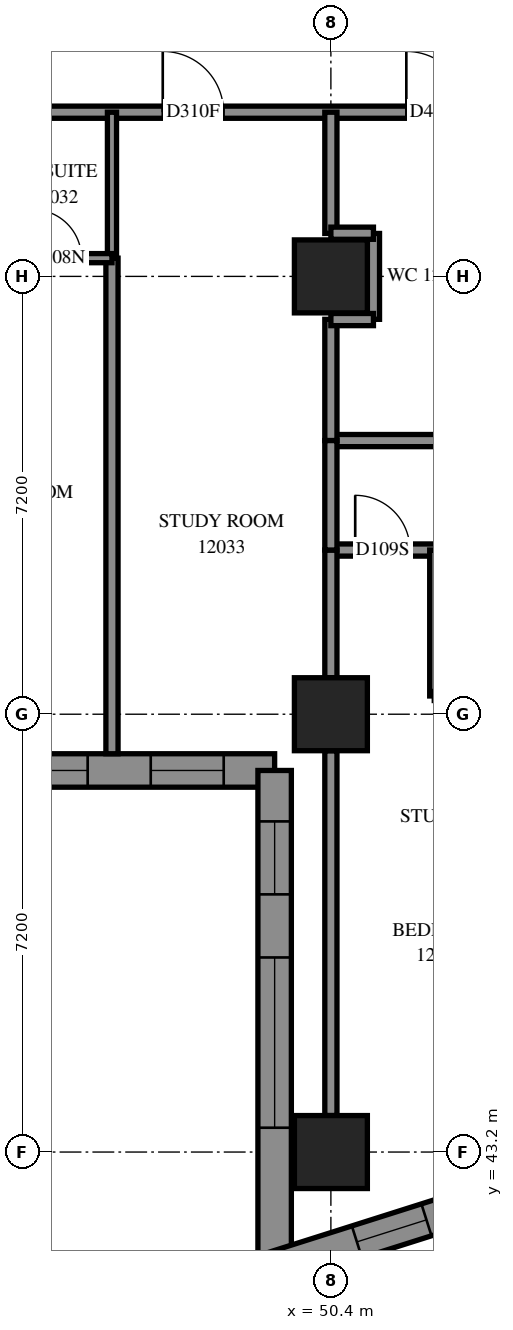
"""IFC4 building model, lengths in metres.
Left out: names, types, materials, properties, quantities, classifications, styles, units other than length and angle.
Written with IfcOpenShell. Run it as: python <this file> out.ifc"""

import sys

from ifc_helpers import new_model, si_unit, direction, frame, frame_2d, origin, origin_2d, place, context, subcontext, project, spatial, polyline, rectangle, outline, extrude, element, fill, save


model = new_model("IFC4")
c1 = context("Model", 3, precision=1e-05, world=origin(), true_north=direction((0.0, 1.0)))
c2 = subcontext(c1, "Body", "Model", "MODEL_VIEW")
j1 = project(units=[si_unit("LENGTHUNIT", "METRE"), si_unit("PLANEANGLEUNIT", "RADIAN")], contexts=[c1])
p1 = place(None, origin())
s1 = spatial("IfcSite", under=j1, at=p1, CompositionType="ELEMENT")
p2 = place(p1, origin())
s2 = spatial("IfcBuilding", under=s1, at=p2, CompositionType="ELEMENT")
p3 = place(p2, frame((0.0, 0.0, 47.4)))
s3 = spatial("IfcBuildingStorey", under=s2, at=p3, CompositionType="ELEMENT", Elevation=47.4)
for number, where, z_axis, x_axis in (
    (1, (50.4, 43.2, 0.0), (0.0, 0.0, 1.0), (1.0, 0.0, 0.0)),
    (2, (50.4, 50.4, 0.0), (0.0, 0.0, 1.0), (1.0, 0.0, 0.0)),
    (3, (50.4, 57.6, 0.0), (0.0, 0.0, 1.0), (1.0, 0.0, 0.0)),
):
    element("IfcColumn", number, at=place(p3, frame(where, z_axis=z_axis, x_axis=x_axis)), inside=s3, PredefinedType="COLUMN", context=c2, shape_type="SweptSolid", body=[
        extrude(rectangle(XDim=1.2, YDim=1.2, at=origin_2d()), origin(), (0.0, 0.0, 1.0), 3.1),
    ])
p4 = place(p3, frame((42.275, 49.475, 0.0), z_axis=(0.0, 0.0, 1.0), x_axis=(1.0, 0.0, 0.0)))
e4 = element("IfcWall", 4, at=p4, inside=s3, PredefinedType="SOLIDWALL", context=c2, shape_type="SweptSolid", body=[
    extrude(outline(polyline([(-0.275, -0.275), (6.925, -0.275), (7.475, 0.275), (0.275, 0.275), (-0.275, -0.275)])), origin(), (0.0, 0.0, 1.0), 3.1),
])
p5 = place(p4, frame((1.325, 0.0, 0.5)))
e5 = element("IfcOpeningElement", 5, at=p5, cuts=e4, PredefinedType="OPENING", context=c2, shape_type="SweptSolid", body=[
    extrude(rectangle(XDim=2.8, YDim=2.45, at=frame_2d((1.4, 1.225))), frame((0.0, 0.285, 0.0), z_axis=(0.0, -1.0, 0.0), x_axis=(1.0, 0.0, 0.0)), (0.0, 0.0, 1.0), 0.57),
])
p6 = place(p4, frame((5.162, 0.0, 0.5)))
e6 = element("IfcOpeningElement", 6, at=p6, cuts=e4, PredefinedType="OPENING", context=c2, shape_type="SweptSolid", body=[
    extrude(rectangle(XDim=1.2, YDim=2.45, at=frame_2d((0.6, 1.225))), frame((0.0, 0.285, 0.0), z_axis=(0.0, -1.0, 0.0), x_axis=(1.0, 0.0, 0.0)), (0.0, 0.0, 1.0), 0.57),
])
p7 = place(p3, frame((49.475, 49.475, 0.0), z_axis=(0.0, 0.0, 1.0), x_axis=(0.0, -1.0, 0.0)))
e7 = element("IfcWall", 7, at=p7, inside=s3, PredefinedType="SOLIDWALL", context=c2, shape_type="SweptSolid", body=[
    extrude(outline(polyline([(0.275, -0.275), (8.557, -0.275), (7.806, 0.275), (-0.275, 0.275), (0.275, -0.275)])), origin(), (0.0, 0.0, 1.0), 3.1),
])
p8 = place(p7, frame((3.075, 0.0, 0.5)))
e8 = element("IfcOpeningElement", 8, at=p8, cuts=e7, PredefinedType="OPENING", context=c2, shape_type="SweptSolid", body=[
    extrude(rectangle(XDim=2.8, YDim=2.45, at=frame_2d((1.4, 1.225))), frame((0.0, 0.285, 0.0), z_axis=(0.0, -1.0, 0.0), x_axis=(1.0, 0.0, 0.0)), (0.0, 0.0, 1.0), 0.57),
])
p9 = place(p7, frame((0.838, 0.0, 0.5)))
e9 = element("IfcOpeningElement", 9, at=p9, cuts=e7, PredefinedType="OPENING", context=c2, shape_type="SweptSolid", body=[
    extrude(rectangle(XDim=1.2, YDim=2.45, at=frame_2d((0.6, 1.225))), frame((0.0, 0.285, 0.0), z_axis=(0.0, -1.0, 0.0), x_axis=(1.0, 0.0, 0.0)), (0.0, 0.0, 1.0), 0.57),
])
p10 = place(p3, frame((49.475, 41.294, 0.0), z_axis=(0.0, 0.0, 1.0), x_axis=(0.9532643936, 0.3021373791, 0.0)))
e10 = element("IfcWall", 10, at=p10, inside=s3, PredefinedType="SOLIDWALL", context=c2, shape_type="SweptSolid", body=[
    extrude(outline(polyline([(-0.376, -0.275), (3.205, -0.275), (3.33, 0.275), (0.376, 0.275), (-0.376, -0.275)])), origin(), (0.0, 0.0, 1.0), 3.1),
])
p11 = place(p10, frame((1.419, 0.0, 0.5)))
e11 = element("IfcOpeningElement", 11, at=p11, cuts=e10, PredefinedType="OPENING", context=c2, shape_type="SweptSolid", body=[
    extrude(rectangle(XDim=1.2, YDim=2.45, at=frame_2d((0.6, 1.225))), frame((0.0, 0.285, 0.0), z_axis=(0.0, -1.0, 0.0), x_axis=(1.0, 0.0, 0.0)), (0.0, 0.0, 1.0), 0.57),
])
p12 = place(p3, frame((28.802, 60.3, 0.0), z_axis=(0.0, 0.0, 1.0), x_axis=(1.0, 0.0, 0.0)))
e12 = element("IfcWall", 12, at=p12, inside=s3, PredefinedType="PARTITIONING", context=c2, shape_type="SweptSolid", body=[
    extrude(rectangle(XDim=24.108, YDim=0.2, at=frame_2d((12.054, 0.0))), origin(), (0.0, 0.0, 1.0), 3.1),
])
p13 = place(p12, frame((11.323, 0.0, 0.0)))
e13 = element("IfcOpeningElement", 13, at=p13, cuts=e12, PredefinedType="OPENING", context=c2, shape_type="SweptSolid", body=[
    extrude(rectangle(XDim=1.0, YDim=2.1, at=frame_2d((0.5, 1.05))), frame((0.0, 0.11, 0.0), z_axis=(0.0, -1.0, 0.0), x_axis=(1.0, 0.0, 0.0)), (0.0, 0.0, 1.0), 0.22),
])
p14 = place(p12, frame((14.798, 0.0, 0.0)))
e14 = element("IfcOpeningElement", 14, at=p14, cuts=e12, PredefinedType="OPENING", context=c2, shape_type="SweptSolid", body=[
    extrude(rectangle(XDim=0.9, YDim=2.1, at=frame_2d((0.45, 1.05))), frame((0.0, 0.11, 0.0), z_axis=(0.0, -1.0, 0.0), x_axis=(1.0, 0.0, 0.0)), (0.0, 0.0, 1.0), 0.22),
])
p15 = place(p12, frame((18.833, 0.0, 0.0)))
e15 = element("IfcOpeningElement", 15, at=p15, cuts=e12, PredefinedType="OPENING", context=c2, shape_type="SweptSolid", body=[
    extrude(rectangle(XDim=1.0, YDim=2.1, at=frame_2d((0.5, 1.05))), frame((0.0, 0.11, 0.0), z_axis=(0.0, -1.0, 0.0), x_axis=(1.0, 0.0, 0.0)), (0.0, 0.0, 1.0), 0.22),
])
p16 = place(p12, frame((22.839, 0.0, 0.0)))
e16 = element("IfcOpeningElement", 16, at=p16, cuts=e12, PredefinedType="OPENING", context=c2, shape_type="SweptSolid", body=[
    extrude(rectangle(XDim=1.0, YDim=2.1, at=frame_2d((0.5, 1.05))), frame((0.0, 0.11, 0.0), z_axis=(0.0, -1.0, 0.0), x_axis=(1.0, 0.0, 0.0)), (0.0, 0.0, 1.0), 0.22),
])
p17 = place(p3, frame((46.8, 49.75, 0.0), z_axis=(0.0, 0.0, 1.0), x_axis=(0.0, 1.0, 0.0)))
e17 = element("IfcWall", 17, at=p17, inside=s3, PredefinedType="PARTITIONING", context=c2, shape_type="SweptSolid", body=[
    extrude(rectangle(XDim=8.15, YDim=0.2, at=frame_2d((4.075, 0.0))), origin(), (0.0, 0.0, 1.0), 3.1),
])
p18 = place(p3, frame((50.4, 43.8, 0.0), z_axis=(0.0, 0.0, 1.0), x_axis=(0.0, 1.0, 0.0)))
e18 = element("IfcWall", 18, at=p18, inside=s3, PredefinedType="PARTITIONING", context=c2, shape_type="SweptSolid", body=[
    extrude(rectangle(XDim=6.0, YDim=0.2, at=frame_2d((3.0, 0.0))), origin(), (0.0, 0.0, 1.0), 2.6),
])
p19 = place(p3, frame((50.4, 53.1, 0.0), z_axis=(0.0, 0.0, 1.0), x_axis=(1.0, 0.0, 0.0)))
e19 = element("IfcWall", 19, at=p19, inside=s3, PredefinedType="PARTITIONING", context=c2, shape_type="SweptSolid", body=[
    extrude(rectangle(XDim=4.1, YDim=0.2, at=frame_2d((2.05, 0.0))), origin(), (0.0, 0.0, 1.0), 3.1),
])
p20 = place(p19, frame((0.4, 0.0, 0.0)))
e20 = element("IfcOpeningElement", 20, at=p20, cuts=e19, PredefinedType="OPENING", context=c2, shape_type="SweptSolid", body=[
    extrude(rectangle(XDim=0.9, YDim=2.1, at=frame_2d((0.45, 1.05))), frame((0.0, 0.11, 0.0), z_axis=(0.0, -1.0, 0.0), x_axis=(1.0, 0.0, 0.0)), (0.0, 0.0, 1.0), 0.22),
])
p21 = place(p3, frame((50.4, 54.9, 0.0), z_axis=(0.0, 0.0, 1.0), x_axis=(1.0, 0.0, 0.0)))
e21 = element("IfcWall", 21, at=p21, inside=s3, PredefinedType="PARTITIONING", context=c2, shape_type="SweptSolid", body=[
    extrude(rectangle(XDim=2.51, YDim=0.2, at=frame_2d((1.255, 0.0))), origin(), (0.0, 0.0, 1.0), 3.1),
])
for number, where, z_axis, x_axis in (
    (22, (46.8, 57.9, 0.0), (0.0, 0.0, 1.0), (0.0, 1.0, 0.0)),
    (23, (52.1, 50.7, 0.0), (0.0, 0.0, 1.0), (0.0, 1.0, 0.0)),
):
    element("IfcWall", number, at=place(p3, frame(where, z_axis=z_axis, x_axis=x_axis)), inside=s3, PredefinedType="PARTITIONING", context=c2, shape_type="SweptSolid", body=[
        extrude(rectangle(XDim=2.4, YDim=0.15, at=frame_2d((1.2, 0.0))), origin(), (0.0, 0.0, 1.0), 3.1),
    ])
p22 = place(p3, frame((50.4, 51.0, 0.0), z_axis=(0.0, 0.0, 1.0), x_axis=(0.0, 1.0, 0.0)))
e24 = element("IfcWall", 24, at=p22, inside=s3, PredefinedType="PARTITIONING", context=c2, shape_type="SweptSolid", body=[
    extrude(rectangle(XDim=2.1, YDim=0.2, at=frame_2d((1.05, 0.0))), origin(), (0.0, 0.0, 1.0), 3.1),
])
for number, where, z_axis, x_axis in (
    (25, (50.4, 54.9, 0.0), (0.0, 0.0, 1.0), (0.0, 1.0, 0.0)),
    (26, (50.4, 58.306, 0.0), (0.0, 0.0, 1.0), (0.0, 1.0, 0.0)),
):
    element("IfcWall", number, at=place(p3, frame(where, z_axis=z_axis, x_axis=x_axis)), inside=s3, PredefinedType="PARTITIONING", context=c2, shape_type="SweptSolid", body=[
        extrude(rectangle(XDim=1.994, YDim=0.2, at=frame_2d((0.997, 0.0))), origin(), (0.0, 0.0, 1.0), 3.1),
    ])
p23 = place(p3, frame((44.9, 57.9, 0.0), z_axis=(0.0, 0.0, 1.0), x_axis=(1.0, 0.0, 0.0)))
e27 = element("IfcWall", 27, at=p23, inside=s3, PredefinedType="PARTITIONING", context=c2, shape_type="SweptSolid", body=[
    extrude(rectangle(XDim=1.9, YDim=0.15, at=frame_2d((0.95, 0.0))), origin(), (0.0, 0.0, 1.0), 3.1),
])
p24 = place(p23, frame((0.598, 0.0, 0.0)))
e28 = element("IfcOpeningElement", 28, at=p24, cuts=e27, PredefinedType="OPENING", context=c2, shape_type="SweptSolid", body=[
    extrude(rectangle(XDim=0.8, YDim=2.1, at=frame_2d((0.4, 1.05))), frame((0.0, 0.085, 0.0), z_axis=(0.0, -1.0, 0.0), x_axis=(1.0, 0.0, 0.0)), (0.0, 0.0, 1.0), 0.17),
])
p25 = place(p3, frame((50.4, 53.1, 0.0), z_axis=(0.0, 0.0, 1.0), x_axis=(0.0, 1.0, 0.0)))
e29 = element("IfcWall", 29, at=p25, inside=s3, PredefinedType="PARTITIONING", context=c2, shape_type="SweptSolid", body=[
    extrude(rectangle(XDim=1.8, YDim=0.2, at=frame_2d((0.9, 0.0))), origin(), (0.0, 0.0, 1.0), 3.1),
])
p26 = place(p3, frame((51.1, 56.894, 0.0), z_axis=(0.0, 0.0, 1.0), x_axis=(0.0, 1.0, 0.0)))
e30 = element("IfcWall", 30, at=p26, inside=s3, PredefinedType="PARTITIONING", context=c2, shape_type="SweptSolid", body=[
    extrude(rectangle(XDim=1.412, YDim=0.2, at=frame_2d((0.706, 0.0))), origin(), (0.0, 0.0, 1.0), 3.1),
])
for number, where, z_axis, x_axis in (
    (31, (50.4, 58.31, 0.0), (0.0, 0.0, 1.0), (1.0, 0.0, 0.0)),
    (32, (50.4, 56.89, 0.0), (0.0, 0.0, 1.0), (1.0, 0.0, 0.0)),
):
    element("IfcWall", number, at=place(p3, frame(where, z_axis=z_axis, x_axis=x_axis)), inside=s3, PredefinedType="PARTITIONING", context=c2, shape_type="SweptSolid", body=[
        extrude(rectangle(XDim=0.7, YDim=0.2, at=frame_2d((0.35, 0.0))), origin(), (0.0, 0.0, 1.0), 3.1),
    ])
p27 = place(p5, origin())
e33 = element("IfcWindow", 33, at=p27, inside=s3, PartitioningType="SINGLE_PANEL", PredefinedType="WINDOW", context=c2, shape_type="SweptSolid", body=[
    extrude(rectangle(XDim=2.8, YDim=2.45, at=frame_2d((1.4, 1.225))), frame((0.0, 0.155, 0.0), z_axis=(0.0, -1.0, 0.0), x_axis=(1.0, 0.0, 0.0)), (0.0, 0.0, 1.0), 0.06),
])
fill(e5, e33)
p28 = place(p6, origin())
e34 = element("IfcWindow", 34, at=p28, inside=s3, PartitioningType="SINGLE_PANEL", PredefinedType="WINDOW", context=c2, shape_type="SweptSolid", body=[
    extrude(rectangle(XDim=1.2, YDim=2.45, at=frame_2d((0.6, 1.225))), frame((0.0, 0.155, 0.0), z_axis=(0.0, -1.0, 0.0), x_axis=(1.0, 0.0, 0.0)), (0.0, 0.0, 1.0), 0.06),
])
fill(e6, e34)
p29 = place(p8, origin())
e35 = element("IfcWindow", 35, at=p29, inside=s3, PartitioningType="SINGLE_PANEL", PredefinedType="WINDOW", context=c2, shape_type="SweptSolid", body=[
    extrude(rectangle(XDim=2.8, YDim=2.45, at=frame_2d((1.4, 1.225))), frame((0.0, 0.155, 0.0), z_axis=(0.0, -1.0, 0.0), x_axis=(1.0, 0.0, 0.0)), (0.0, 0.0, 1.0), 0.06),
])
fill(e8, e35)
p30 = place(p9, origin())
e36 = element("IfcWindow", 36, at=p30, inside=s3, PartitioningType="SINGLE_PANEL", PredefinedType="WINDOW", context=c2, shape_type="SweptSolid", body=[
    extrude(rectangle(XDim=1.2, YDim=2.45, at=frame_2d((0.6, 1.225))), frame((0.0, 0.155, 0.0), z_axis=(0.0, -1.0, 0.0), x_axis=(1.0, 0.0, 0.0)), (0.0, 0.0, 1.0), 0.06),
])
fill(e9, e36)
p31 = place(p11, origin())
e37 = element("IfcWindow", 37, at=p31, inside=s3, PartitioningType="SINGLE_PANEL", PredefinedType="WINDOW", context=c2, shape_type="SweptSolid", body=[
    extrude(rectangle(XDim=1.2, YDim=2.45, at=frame_2d((0.6, 1.225))), frame((0.0, 0.155, 0.0), z_axis=(0.0, -1.0, 0.0), x_axis=(1.0, 0.0, 0.0)), (0.0, 0.0, 1.0), 0.06),
])
fill(e11, e37)
p32 = place(p24, origin())
e38 = element("IfcDoor", 38, at=p32, inside=s3, OperationType="SINGLE_SWING_RIGHT", PredefinedType="DOOR", context=c2, shape_type="SweptSolid", body=[
    extrude(rectangle(XDim=0.8, YDim=2.1, at=frame_2d((0.4, 1.05))), frame((0.0, 0.025, 0.0), z_axis=(0.0, -1.0, 0.0), x_axis=(1.0, 0.0, 0.0)), (0.0, 0.0, 1.0), 0.05),
])
fill(e28, e38)
p33 = place(p15, origin())
e39 = element("IfcDoor", 39, at=p33, inside=s3, OperationType="SINGLE_SWING_RIGHT", PredefinedType="DOOR", context=c2, shape_type="SweptSolid", body=[
    extrude(rectangle(XDim=1.0, YDim=2.1, at=frame_2d((0.5, 1.05))), frame((0.0, 0.025, 0.0), z_axis=(0.0, -1.0, 0.0), x_axis=(1.0, 0.0, 0.0)), (0.0, 0.0, 1.0), 0.05),
])
fill(e15, e39)
p34 = place(p16, origin())
e40 = element("IfcDoor", 40, at=p34, inside=s3, OperationType="SINGLE_SWING_LEFT", PredefinedType="DOOR", context=c2, shape_type="SweptSolid", body=[
    extrude(rectangle(XDim=1.0, YDim=2.1, at=frame_2d((0.5, 1.05))), frame((0.0, 0.025, 0.0), z_axis=(0.0, -1.0, 0.0), x_axis=(1.0, 0.0, 0.0)), (0.0, 0.0, 1.0), 0.05),
])
fill(e16, e40)
p35 = place(p20, origin())
e41 = element("IfcDoor", 41, at=p35, inside=s3, OperationType="SINGLE_SWING_LEFT", PredefinedType="DOOR", context=c2, shape_type="SweptSolid", body=[
    extrude(rectangle(XDim=0.9, YDim=2.1, at=frame_2d((0.45, 1.05))), frame((0.0, 0.025, 0.0), z_axis=(0.0, -1.0, 0.0), x_axis=(1.0, 0.0, 0.0)), (0.0, 0.0, 1.0), 0.05),
])
fill(e20, e41)
save(model, sys.argv[1])
